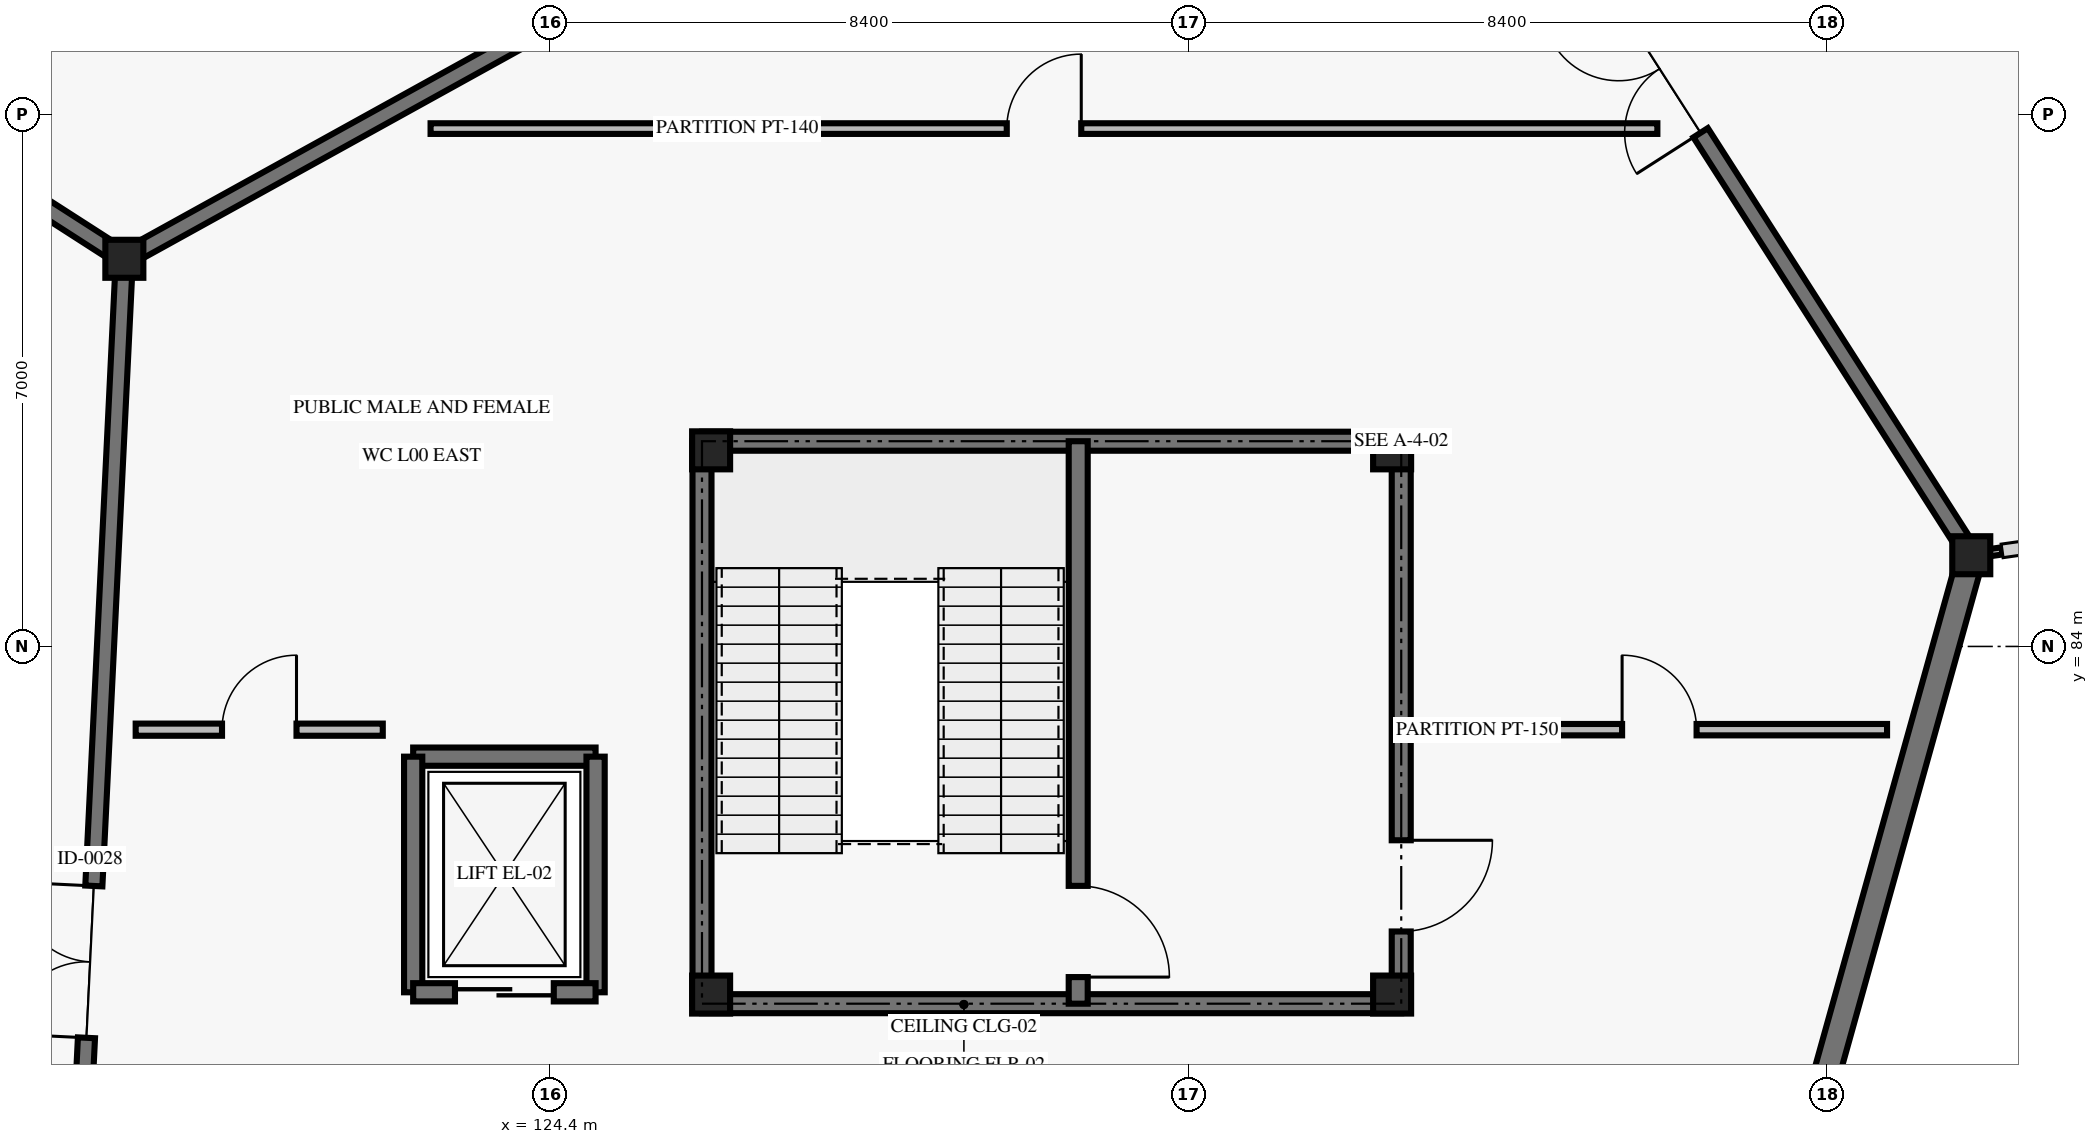
"""IFC4 building model, lengths in metres.
Left out: names, types, materials, properties, quantities, classifications, styles, units other than length and angle.
Written with IfcOpenShell. Run it as: python <this file> out.ifc"""

import sys

from ifc_helpers import new_model, si_unit, direction, frame, frame_2d, origin, origin_2d, place, context, subcontext, project, spatial, rectangle, i_section, extrude, element, fill, save


model = new_model("IFC4")
c1 = context("Model", 3, precision=1e-05, world=origin(), true_north=direction((0.0, 1.0)))
c2 = subcontext(c1, "Body", "Model", "MODEL_VIEW")
j1 = project(units=[si_unit("LENGTHUNIT", "METRE"), si_unit("PLANEANGLEUNIT", "RADIAN")], contexts=[c1])
p1 = place(None, origin())
s1 = spatial("IfcSite", under=j1, at=p1, CompositionType="ELEMENT")
p2 = place(p1, origin())
s2 = spatial("IfcBuilding", under=s1, at=p2, CompositionType="ELEMENT")
p3 = place(p2, origin())
s3 = spatial("IfcBuildingStorey", under=s2, at=p3, CompositionType="ELEMENT", Elevation=0.0)
for number, where, z_axis, x_axis in (
    (1, (118.8, 89.1, 0.0), (0.0, 0.0, 1.0), (1.0, 0.0, 0.0)),
    (2, (143.1, 85.2, 0.0), (0.0, 0.0, 1.0), (1.0, 0.0, 0.0)),
    (3, (126.52, 79.42, 0.0), (0.0, 0.0, 1.0), (1.0, 0.0, 0.0)),
    (4, (135.48, 79.42, 0.0), (0.0, 0.0, 1.0), (1.0, 0.0, 0.0)),
    (5, (135.48, 86.58, 0.0), (0.0, 0.0, 1.0), (1.0, 0.0, 0.0)),
    (6, (126.52, 86.58, 0.0), (0.0, 0.0, 1.0), (1.0, 0.0, 0.0)),
):
    element("IfcColumn", number, at=place(p3, frame(where, z_axis=z_axis, x_axis=x_axis)), inside=s3, PredefinedType="COLUMN", context=c2, shape_type="SweptSolid", body=[
        extrude(i_section(OverallWidth=0.5, OverallDepth=0.5, WebThickness=0.022, FlangeThickness=0.036, at=origin_2d()), origin(), (0.0, 0.0, 1.0), 5.4),
    ])
p4 = place(p3, frame((143.084, 85.142, 0.0), z_axis=(0.0, 0.0, 1.0), x_axis=(-0.268810029922, -0.963193214165, 0.0)))
e7 = element("IfcWall", 7, at=p4, inside=s3, PredefinedType="SOLIDWALL", context=c2, shape_type="SweptSolid", body=[
    extrude(rectangle(XDim=13.333, YDim=0.34, at=frame_2d((6.667, 0.0))), origin(), (0.0, 0.0, 1.0), 4.22),
])
p5 = place(p3, frame((143.506, 85.257, 0.0), z_axis=(0.0, 0.0, 1.0), x_axis=(-0.990232667812, -0.139424759628, 0.0)))
e8 = element("IfcWall", 8, at=p5, inside=s3, PredefinedType="SOLIDWALL", context=c2, shape_type="SweptSolid", body=[
    extrude(rectangle(XDim=0.308, YDim=0.095, at=frame_2d((0.154, 0.0))), origin(), (0.0, 0.0, 1.0), 4.22),
])
p6 = place(p3, frame((117.9, 70.6, 0.0), z_axis=(0.0, 0.0, 1.0), x_axis=(0.048599072515, 0.998818366947, 0.0)))
e9 = element("IfcWall", 9, at=p6, inside=s3, PredefinedType="SOLIDWALL", context=c2, shape_type="SweptSolid", body=[
    extrude(rectangle(XDim=18.522, YDim=0.225, at=frame_2d((9.261, 0.0))), origin(), (0.0, 0.0, 1.0), 4.62),
])
p7 = place(p6, frame((8.261, 0.0, 0.0)))
e10 = element("IfcOpeningElement", 10, at=p7, cuts=e9, PredefinedType="OPENING", context=c2, shape_type="SweptSolid", body=[
    extrude(rectangle(XDim=2.0, YDim=2.5, at=frame_2d((1.0, 1.25))), frame((0.0, 0.123, 0.0), z_axis=(0.0, -1.0, 0.0), x_axis=(1.0, 0.0, 0.0)), (0.0, 0.0, 1.0), 0.245),
])
p8 = place(p3, frame((118.8, 89.1, 0.0), z_axis=(0.0, 0.0, 1.0), x_axis=(-0.841183241423, 0.540750177392, 0.0)))
e11 = element("IfcWall", 11, at=p8, inside=s3, PredefinedType="SOLIDWALL", context=c2, shape_type="SweptSolid", body=[
    extrude(rectangle(XDim=18.308, YDim=0.225, at=frame_2d((9.154, 0.0))), origin(), (0.0, 0.0, 1.0), 4.62),
])
p9 = place(p8, frame((8.229, 0.0, 0.0)))
e12 = element("IfcOpeningElement", 12, at=p9, cuts=e11, PredefinedType="OPENING", context=c2, shape_type="SweptSolid", body=[
    extrude(rectangle(XDim=1.85, YDim=2.4, at=frame_2d((0.925, 1.2))), frame((0.0, 0.123, 0.0), z_axis=(0.0, -1.0, 0.0), x_axis=(1.0, 0.0, 0.0)), (0.0, 0.0, 1.0), 0.245),
])
p10 = place(p3, frame((134.9, 98.0, 0.0), z_axis=(0.0, 0.0, 1.0), x_axis=(-0.875181353329, -0.483794996652, 0.0)))
e13 = element("IfcWall", 13, at=p10, inside=s3, PredefinedType="SOLIDWALL", context=c2, shape_type="SweptSolid", body=[
    extrude(rectangle(XDim=18.396, YDim=0.225, at=frame_2d((9.198, 0.0))), origin(), (0.0, 0.0, 1.0), 4.62),
])
p11 = place(p10, frame((8.098, 0.0, 0.0)))
e14 = element("IfcOpeningElement", 14, at=p11, cuts=e13, PredefinedType="OPENING", context=c2, shape_type="SweptSolid", body=[
    extrude(rectangle(XDim=2.2, YDim=2.6, at=frame_2d((1.1, 1.3))), frame((0.0, 0.123, 0.0), z_axis=(0.0, -1.0, 0.0), x_axis=(1.0, 0.0, 0.0)), (0.0, 0.0, 1.0), 0.245),
])
p12 = place(p3, frame((143.1, 85.2, 0.0), z_axis=(0.0, 0.0, 1.0), x_axis=(-0.539434641352, 0.842027474439, 0.0)))
e15 = element("IfcWall", 15, at=p12, inside=s3, PredefinedType="SOLIDWALL", context=c2, shape_type="SweptSolid", body=[
    extrude(rectangle(XDim=15.201, YDim=0.225, at=frame_2d((7.601, 0.0))), origin(), (0.0, 0.0, 1.0), 4.62),
])
p13 = place(p12, frame((6.601, 0.0, 0.0)))
e16 = element("IfcOpeningElement", 16, at=p13, cuts=e15, PredefinedType="OPENING", context=c2, shape_type="SweptSolid", body=[
    extrude(rectangle(XDim=2.0, YDim=2.5, at=frame_2d((1.0, 1.25))), frame((0.0, 0.123, 0.0), z_axis=(0.0, -1.0, 0.0), x_axis=(1.0, 0.0, 0.0)), (0.0, 0.0, 1.0), 0.245),
])
p14 = place(p3, frame((118.949, 82.905, 0.0), z_axis=(0.0, 0.0, 1.0), x_axis=(1.0, 0.0, 0.0)))
e17 = element("IfcWall", 17, at=p14, inside=s3, PredefinedType="PARTITIONING", context=c2, shape_type="SweptSolid", body=[
    extrude(rectangle(XDim=3.251, YDim=0.16, at=frame_2d((1.625, 0.0))), origin(), (0.0, 0.0, 1.0), 3.92),
])
p15 = place(p14, frame((1.136, 0.0, 0.0)))
e18 = element("IfcOpeningElement", 18, at=p15, cuts=e17, PredefinedType="OPENING", context=c2, shape_type="SweptSolid", body=[
    extrude(rectangle(XDim=0.98, YDim=2.15, at=frame_2d((0.49, 1.075))), frame((0.0, 0.09, 0.0), z_axis=(0.0, -1.0, 0.0), x_axis=(1.0, 0.0, 0.0)), (0.0, 0.0, 1.0), 0.18),
])
p16 = place(p3, frame((136.0, 82.905, 0.0), z_axis=(0.0, 0.0, 1.0), x_axis=(1.0, 0.0, 0.0)))
e19 = element("IfcWall", 19, at=p16, inside=s3, PredefinedType="PARTITIONING", context=c2, shape_type="SweptSolid", body=[
    extrude(rectangle(XDim=5.992, YDim=0.15, at=frame_2d((2.996, 0.0))), origin(), (0.0, 0.0, 1.0), 3.92),
])
p17 = place(p16, frame((2.506, 0.0, 0.0)))
e20 = element("IfcOpeningElement", 20, at=p17, cuts=e19, PredefinedType="OPENING", context=c2, shape_type="SweptSolid", body=[
    extrude(rectangle(XDim=0.98, YDim=2.15, at=frame_2d((0.49, 1.075))), frame((0.0, 0.085, 0.0), z_axis=(0.0, -1.0, 0.0), x_axis=(1.0, 0.0, 0.0)), (0.0, 0.0, 1.0), 0.17),
])
p18 = place(p3, frame((122.829, 90.813, 0.0), z_axis=(0.0, 0.0, 1.0), x_axis=(1.0, 0.0, 0.0)))
e21 = element("IfcWall", 21, at=p18, inside=s3, PredefinedType="PARTITIONING", context=c2, shape_type="SweptSolid", body=[
    extrude(rectangle(XDim=16.141, YDim=0.14, at=frame_2d((8.07, 0.0))), origin(), (0.0, 0.0, 1.0), 3.92),
])
p19 = place(p18, frame((7.581, 0.0, 0.0)))
e22 = element("IfcOpeningElement", 22, at=p19, cuts=e21, PredefinedType="OPENING", context=c2, shape_type="SweptSolid", body=[
    extrude(rectangle(XDim=0.98, YDim=2.15, at=frame_2d((0.49, 1.075))), frame((0.0, 0.08, 0.0), z_axis=(0.0, -1.0, 0.0), x_axis=(1.0, 0.0, 0.0)), (0.0, 0.0, 1.0), 0.16),
])
p20 = place(p3, frame((126.4, 79.3, 0.0), z_axis=(0.0, 0.0, 1.0), x_axis=(0.0, 1.0, 0.0)))
e23 = element("IfcWall", 23, at=p20, inside=s3, PredefinedType="SHEAR", context=c2, shape_type="SweptSolid", body=[
    extrude(rectangle(XDim=7.4, YDim=0.25, at=frame_2d((3.7, 0.0))), origin(), (0.0, 0.0, 1.0), 5.16),
])
for number, where, z_axis, x_axis in (
    (24, (126.4, 86.7, 0.0), (0.0, 0.0, 1.0), (1.0, 0.0, 0.0)),
    (25, (135.6, 79.3, 0.0), (0.0, 0.0, 1.0), (-1.0, 0.0, 0.0)),
):
    element("IfcWall", number, at=place(p3, frame(where, z_axis=z_axis, x_axis=x_axis)), inside=s3, PredefinedType="SHEAR", context=c2, shape_type="SweptSolid", body=[
        extrude(rectangle(XDim=9.2, YDim=0.25, at=frame_2d((4.6, 0.0))), origin(), (0.0, 0.0, 1.0), 5.16),
    ])
p21 = place(p3, frame((135.6, 86.7, 0.0), z_axis=(0.0, 0.0, 1.0), x_axis=(0.0, -1.0, 0.0)))
e26 = element("IfcWall", 26, at=p21, inside=s3, PredefinedType="SHEAR", context=c2, shape_type="SweptSolid", body=[
    extrude(rectangle(XDim=7.4, YDim=0.25, at=frame_2d((3.7, 0.0))), origin(), (0.0, 0.0, 1.0), 5.16),
])
p22 = place(p21, frame((5.25, 0.0, 0.0)))
e27 = element("IfcOpeningElement", 27, at=p22, cuts=e26, PredefinedType="OPENING", context=c2, shape_type="SweptSolid", body=[
    extrude(rectangle(XDim=1.2, YDim=2.2, at=frame_2d((0.6, 1.1))), frame((0.0, 0.135, 0.0), z_axis=(0.0, -1.0, 0.0), x_axis=(1.0, 0.0, 0.0)), (0.0, 0.0, 1.0), 0.27),
])
p23 = place(p3, frame((131.35, 86.7, 0.0), z_axis=(0.0, 0.0, 1.0), x_axis=(0.0, -1.0, 0.0)))
e28 = element("IfcWall", 28, at=p23, inside=s3, PredefinedType="SHEAR", context=c2, shape_type="SweptSolid", body=[
    extrude(rectangle(XDim=7.4, YDim=0.25, at=frame_2d((3.7, 0.0))), origin(), (0.0, 0.0, 1.0), 5.16),
])
p24 = place(p23, frame((5.85, 0.0, 0.0)))
e29 = element("IfcOpeningElement", 29, at=p24, cuts=e28, PredefinedType="OPENING", context=c2, shape_type="SweptSolid", body=[
    extrude(rectangle(XDim=1.2, YDim=2.2, at=frame_2d((0.6, 1.1))), frame((0.0, 0.135, 0.0), z_axis=(0.0, -1.0, 0.0), x_axis=(1.0, 0.0, 0.0)), (0.0, 0.0, 1.0), 0.27),
])
p25 = place(p3, frame((122.6, 82.55, 0.0), z_axis=(0.0, 0.0, 1.0), x_axis=(1.0, 0.0, 0.0)))
e30 = element("IfcWall", 30, at=p25, inside=s3, PredefinedType="SHEAR", context=c2, shape_type="SweptSolid", body=[
    extrude(rectangle(XDim=2.4, YDim=0.24, at=frame_2d((1.2, 0.0))), origin(), (0.0, 0.0, 1.0), 5.16),
])
for number, where, z_axis, x_axis in (
    (31, (125.0, 82.55, 0.0), (0.0, 0.0, 1.0), (0.0, -1.0, 0.0)),
    (32, (122.6, 79.45, 0.0), (0.0, 0.0, 1.0), (0.0, 1.0, 0.0)),
):
    element("IfcWall", number, at=place(p3, frame(where, z_axis=z_axis, x_axis=x_axis)), inside=s3, PredefinedType="SHEAR", context=c2, shape_type="SweptSolid", body=[
        extrude(rectangle(XDim=3.1, YDim=0.24, at=frame_2d((1.55, 0.0))), origin(), (0.0, 0.0, 1.0), 5.16),
    ])
p26 = place(p3, frame((125.0, 79.45, 0.0), z_axis=(0.0, 0.0, 1.0), x_axis=(-1.0, 0.0, 0.0)))
e33 = element("IfcWall", 33, at=p26, inside=s3, PredefinedType="SHEAR", context=c2, shape_type="SweptSolid", body=[
    extrude(rectangle(XDim=2.4, YDim=0.24, at=frame_2d((1.2, 0.0))), origin(), (0.0, 0.0, 1.0), 5.16),
])
p27 = place(p26, frame((0.55, 0.0, 0.0)))
e34 = element("IfcOpeningElement", 34, at=p27, cuts=e33, PredefinedType="OPENING", context=c2, shape_type="SweptSolid", body=[
    extrude(rectangle(XDim=1.3, YDim=2.25, at=frame_2d((0.65, 1.125))), frame((0.0, 0.13, 0.0), z_axis=(0.0, -1.0, 0.0), x_axis=(1.0, 0.0, 0.0)), (0.0, 0.0, 1.0), 0.26),
])
p28 = place(p7, origin())
e35 = element("IfcDoor", 35, at=p28, inside=s3, OperationType="DOUBLE_DOOR_SINGLE_SWING", PredefinedType="DOOR", context=c2, shape_type="SweptSolid", body=[
    extrude(rectangle(XDim=2.0, YDim=2.5, at=frame_2d((1.0, 1.25))), frame((0.0, 0.025, 0.0), z_axis=(0.0, -1.0, 0.0), x_axis=(1.0, 0.0, 0.0)), (0.0, 0.0, 1.0), 0.05),
])
fill(e10, e35)
p29 = place(p13, origin())
e36 = element("IfcDoor", 36, at=p29, inside=s3, OperationType="DOUBLE_DOOR_SINGLE_SWING", PredefinedType="DOOR", context=c2, shape_type="SweptSolid", body=[
    extrude(rectangle(XDim=2.0, YDim=2.5, at=frame_2d((1.0, 1.25))), frame((0.0, 0.025, 0.0), z_axis=(0.0, -1.0, 0.0), x_axis=(1.0, 0.0, 0.0)), (0.0, 0.0, 1.0), 0.05),
])
fill(e16, e36)
p30 = place(p15, origin())
e37 = element("IfcDoor", 37, at=p30, inside=s3, OperationType="SINGLE_SWING_RIGHT", PredefinedType="DOOR", context=c2, shape_type="SweptSolid", body=[
    extrude(rectangle(XDim=0.98, YDim=2.15, at=frame_2d((0.49, 1.075))), frame((0.0, 0.025, 0.0), z_axis=(0.0, -1.0, 0.0), x_axis=(1.0, 0.0, 0.0)), (0.0, 0.0, 1.0), 0.05),
])
fill(e18, e37)
p31 = place(p17, origin())
e38 = element("IfcDoor", 38, at=p31, inside=s3, OperationType="SINGLE_SWING_LEFT", PredefinedType="DOOR", context=c2, shape_type="SweptSolid", body=[
    extrude(rectangle(XDim=0.98, YDim=2.15, at=frame_2d((0.49, 1.075))), frame((0.0, 0.025, 0.0), z_axis=(0.0, -1.0, 0.0), x_axis=(1.0, 0.0, 0.0)), (0.0, 0.0, 1.0), 0.05),
])
fill(e20, e38)
p32 = place(p19, origin())
e39 = element("IfcDoor", 39, at=p32, inside=s3, OperationType="SINGLE_SWING_RIGHT", PredefinedType="DOOR", context=c2, shape_type="SweptSolid", body=[
    extrude(rectangle(XDim=0.98, YDim=2.15, at=frame_2d((0.49, 1.075))), frame((0.0, 0.025, 0.0), z_axis=(0.0, -1.0, 0.0), x_axis=(1.0, 0.0, 0.0)), (0.0, 0.0, 1.0), 0.05),
])
fill(e22, e39)
p33 = place(p22, origin())
e40 = element("IfcDoor", 40, at=p33, inside=s3, OperationType="SINGLE_SWING_LEFT", PredefinedType="DOOR", context=c2, shape_type="SweptSolid", body=[
    extrude(rectangle(XDim=1.2, YDim=2.2, at=frame_2d((0.6, 1.1))), frame((0.0, 0.025, 0.0), z_axis=(0.0, -1.0, 0.0), x_axis=(1.0, 0.0, 0.0)), (0.0, 0.0, 1.0), 0.05),
])
fill(e27, e40)
p34 = place(p24, origin())
e41 = element("IfcDoor", 41, at=p34, inside=s3, OperationType="SINGLE_SWING_RIGHT", PredefinedType="DOOR", context=c2, shape_type="SweptSolid", body=[
    extrude(rectangle(XDim=1.2, YDim=2.2, at=frame_2d((0.6, 1.1))), frame((0.0, 0.025, 0.0), z_axis=(0.0, -1.0, 0.0), x_axis=(1.0, 0.0, 0.0)), (0.0, 0.0, 1.0), 0.05),
])
fill(e29, e41)
p35 = place(p27, origin())
e42 = element("IfcDoor", 42, at=p35, inside=s3, OperationType="SLIDING_TO_LEFT", PredefinedType="DOOR", context=c2, shape_type="SweptSolid", body=[
    extrude(rectangle(XDim=1.3, YDim=2.25, at=frame_2d((0.65, 1.125))), frame((0.0, 0.025, 0.0), z_axis=(0.0, -1.0, 0.0), x_axis=(1.0, 0.0, 0.0)), (0.0, 0.0, 1.0), 0.05),
])
fill(e34, e42)
save(model, sys.argv[1])
